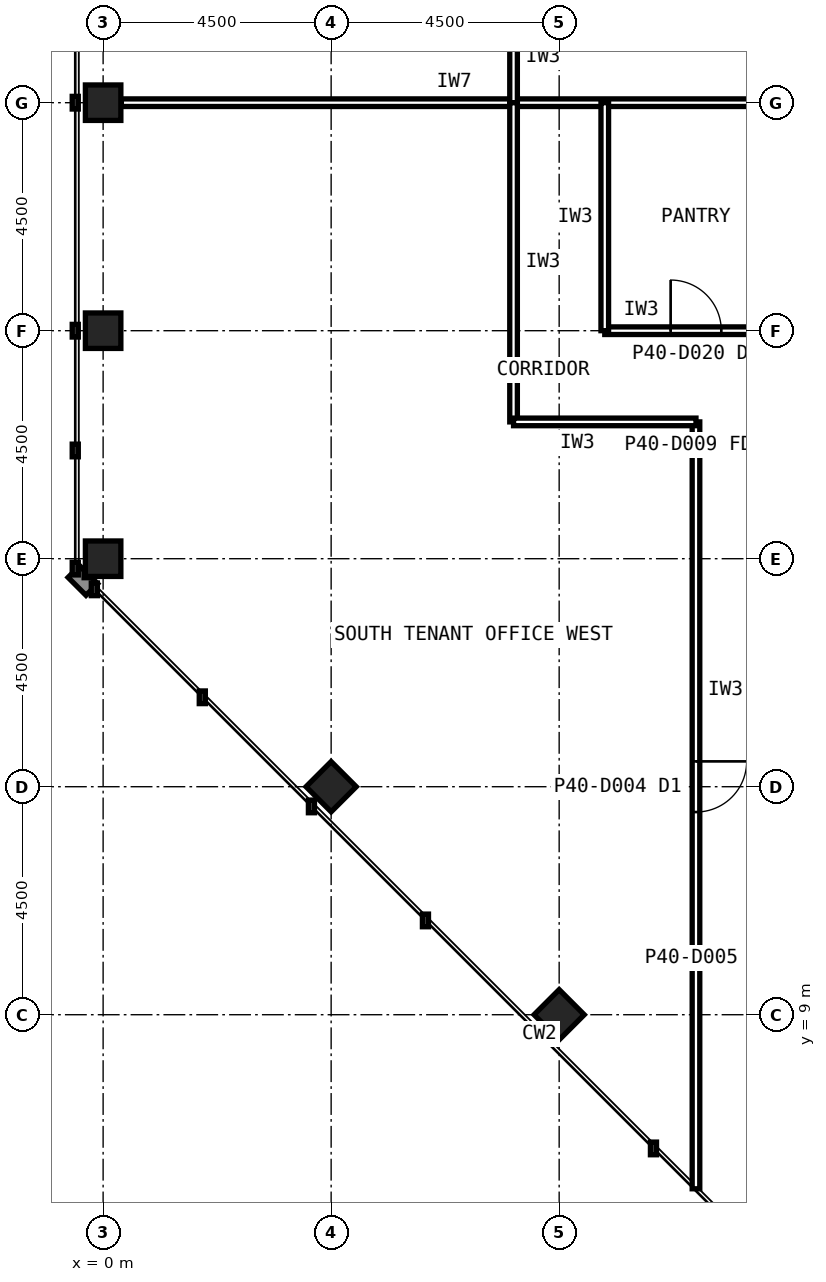
"""IFC4 building model, lengths in metres.
Left out: names, types, materials, properties, quantities, classifications, styles, units other than length and angle.
Written with IfcOpenShell. Run it as: python <this file> out.ifc"""

import sys

from ifc_helpers import new_model, si_unit, direction, frame, frame_2d, origin, origin_2d, place, context, subcontext, project, spatial, rectangle, hollow_rectangle, extrude, element, fill, save


model = new_model("IFC4")
c1 = context("Model", 3, precision=1e-05, world=origin(), true_north=direction((0.0, 1.0)))
c2 = subcontext(c1, "Body", "Model", "MODEL_VIEW")
j1 = project(units=[si_unit("LENGTHUNIT", "METRE"), si_unit("PLANEANGLEUNIT", "RADIAN")], contexts=[c1])
p1 = place(None, origin())
s1 = spatial("IfcSite", under=j1, at=p1, CompositionType="ELEMENT")
p2 = place(p1, origin())
s2 = spatial("IfcBuilding", under=s1, at=p2, CompositionType="ELEMENT")
p3 = place(p2, frame((0.0, 0.0, 167.6)))
s3 = spatial("IfcBuildingStorey", under=s2, at=p3, CompositionType="ELEMENT", Elevation=167.6)
for number, where, z_axis, x_axis in (
    (1, (0.0, 27.0, 0.0), (0.0, 0.0, 1.0), (1.0, 0.0, 0.0)),
    (2, (0.0, 22.5, 0.0), (0.0, 0.0, 1.0), (1.0, 0.0, 0.0)),
    (3, (0.0, 18.0, 0.0), (0.0, 0.0, 1.0), (1.0, 0.0, 0.0)),
    (4, (9.0, 9.0, 0.0), (0.0, 0.0, 1.0), (0.707, 0.707, 0.0)),
    (5, (4.5, 13.5, 0.0), (0.0, 0.0, 1.0), (0.707, 0.707, 0.0)),
):
    element("IfcColumn", number, at=place(p3, frame(where, z_axis=z_axis, x_axis=x_axis)), inside=s3, PredefinedType="COLUMN", context=c2, shape_type="SweptSolid", body=[
        extrude(hollow_rectangle(XDim=0.7, YDim=0.7, WallThickness=0.036, at=origin_2d()), origin(), (0.0, 0.0, 1.0), 4.0),
    ])
p4 = place(p3, frame((0.36, 27.0, 0.0), z_axis=(0.0, 0.0, 1.0), x_axis=(1.0, 0.0, 0.0)))
e6 = element("IfcWall", 6, at=p4, inside=s3, PredefinedType="PARTITIONING", context=c2, shape_type="SweptSolid", body=[
    extrude(rectangle(XDim=13.14, YDim=0.15, at=frame_2d((6.57, 0.0))), origin(), (0.0, 0.0, 1.0), 2.989),
])
p5 = place(p3, frame((8.1, 28.8, 0.0), z_axis=(0.0, 0.0, 1.0), x_axis=(0.0, -1.0, 0.0)))
e7 = element("IfcWall", 7, at=p5, inside=s3, PredefinedType="PARTITIONING", context=c2, shape_type="SweptSolid", body=[
    extrude(rectangle(XDim=1.8, YDim=0.15, at=frame_2d((0.9, 0.0))), origin(), (0.0, 0.0, 1.0), 3.84),
])
p6 = place(p3, frame((11.7, 20.7, 0.0), z_axis=(0.0, 0.0, 1.0), x_axis=(0.0, -1.0, 0.0)))
e8 = element("IfcWall", 8, at=p6, inside=s3, PredefinedType="PARTITIONING", context=c2, shape_type="SweptSolid", body=[
    extrude(rectangle(XDim=15.135, YDim=0.15, at=frame_2d((7.568, 0.0))), origin(), (0.0, 0.0, 1.0), 3.84),
])
p7 = place(p6, frame((6.7, 0.0, 0.0)))
e9 = element("IfcOpeningElement", 9, at=p7, cuts=e8, PredefinedType="OPENING", context=c2, shape_type="SweptSolid", body=[
    extrude(rectangle(XDim=1.0, YDim=2.1, at=frame_2d((0.5, 1.05))), frame((0.0, 0.085, 0.0), z_axis=(0.0, -1.0, 0.0), x_axis=(1.0, 0.0, 0.0)), (0.0, 0.0, 1.0), 0.17),
])
p8 = place(p3, frame((8.1, 27.0, 0.0), z_axis=(0.0, 0.0, 1.0), x_axis=(0.0, -1.0, 0.0)))
e10 = element("IfcWall", 10, at=p8, inside=s3, PredefinedType="PARTITIONING", context=c2, shape_type="SweptSolid", body=[
    extrude(rectangle(XDim=6.3, YDim=0.15, at=frame_2d((3.15, 0.0))), origin(), (0.0, 0.0, 1.0), 3.84),
])
p9 = place(p3, frame((8.1, 20.7, 0.0), z_axis=(0.0, 0.0, 1.0), x_axis=(1.0, 0.0, 0.0)))
e11 = element("IfcWall", 11, at=p9, inside=s3, PredefinedType="PARTITIONING", context=c2, shape_type="SweptSolid", body=[
    extrude(rectangle(XDim=3.6, YDim=0.15, at=frame_2d((1.8, 0.0))), origin(), (0.0, 0.0, 1.0), 3.84),
])
p10 = place(p3, frame((9.9, 22.5, 0.0), z_axis=(0.0, 0.0, 1.0), x_axis=(1.0, 0.0, 0.0)))
e12 = element("IfcWall", 12, at=p10, inside=s3, PredefinedType="PARTITIONING", context=c2, shape_type="SweptSolid", body=[
    extrude(rectangle(XDim=3.6, YDim=0.15, at=frame_2d((1.8, 0.0))), origin(), (0.0, 0.0, 1.0), 2.989),
])
p11 = place(p10, frame((1.3, 0.0, 0.0)))
e13 = element("IfcOpeningElement", 13, at=p11, cuts=e12, PredefinedType="OPENING", context=c2, shape_type="SweptSolid", body=[
    extrude(rectangle(XDim=1.0, YDim=2.1, at=frame_2d((0.5, 1.05))), frame((0.0, 0.085, 0.0), z_axis=(0.0, -1.0, 0.0), x_axis=(1.0, 0.0, 0.0)), (0.0, 0.0, 1.0), 0.17),
])
p12 = place(p3, frame((9.9, 27.0, 0.0), z_axis=(0.0, 0.0, 1.0), x_axis=(0.0, -1.0, 0.0)))
e14 = element("IfcWall", 14, at=p12, inside=s3, PredefinedType="PARTITIONING", context=c2, shape_type="SweptSolid", body=[
    extrude(rectangle(XDim=4.5, YDim=0.15, at=frame_2d((2.25, 0.0))), origin(), (0.0, 0.0, 1.0), 3.84),
])
p13 = place(p7, origin())
e15 = element("IfcDoor", 15, at=p13, inside=s3, OperationType="SINGLE_SWING_LEFT", PredefinedType="DOOR", context=c2, shape_type="SweptSolid", body=[
    extrude(rectangle(XDim=1.0, YDim=2.1, at=frame_2d((0.5, 1.05))), frame((0.0, 0.025, 0.0), z_axis=(0.0, -1.0, 0.0), x_axis=(1.0, 0.0, 0.0)), (0.0, 0.0, 1.0), 0.05),
])
fill(e9, e15)
p14 = place(p11, origin())
e16 = element("IfcDoor", 16, at=p14, inside=s3, OperationType="SINGLE_SWING_LEFT", PredefinedType="DOOR", context=c2, shape_type="SweptSolid", body=[
    extrude(rectangle(XDim=1.0, YDim=2.1, at=frame_2d((0.5, 1.05))), frame((0.0, 0.025, 0.0), z_axis=(0.0, -1.0, 0.0), x_axis=(1.0, 0.0, 0.0)), (0.0, 0.0, 1.0), 0.05),
])
fill(e13, e16)
save(model, sys.argv[1])
